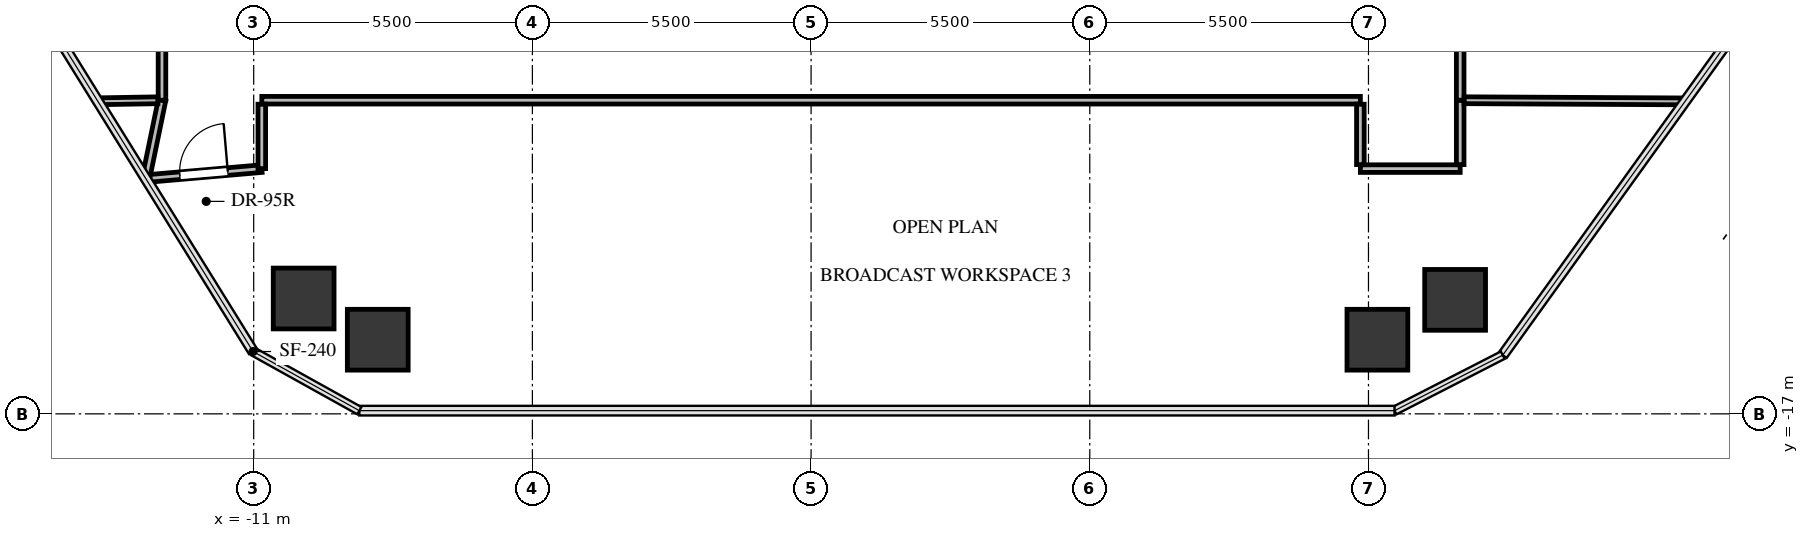
"""IFC4 building model, lengths in metres.
Left out: names, types, materials, properties, quantities, classifications, styles, units other than length and angle.
Written with IfcOpenShell. Run it as: python <this file> out.ifc"""

import sys

from ifc_helpers import new_model, si_unit, direction, frame, frame_2d, origin, origin_2d, place, context, subcontext, project, spatial, rectangle, extrude, source, transform, mapped, element, fill, save


model = new_model("IFC4")
c1 = context("Model", 3, precision=1e-05, world=origin(), true_north=direction((0.0, 1.0)))
c2 = subcontext(c1, "Body", "Model", "MODEL_VIEW")
j1 = project(units=[si_unit("LENGTHUNIT", "METRE"), si_unit("PLANEANGLEUNIT", "RADIAN")], contexts=[c1])
p1 = place(None, origin())
s1 = spatial("IfcSite", under=j1, at=p1, CompositionType="ELEMENT")
p2 = place(p1, origin())
s2 = spatial("IfcBuilding", under=s1, at=p2, CompositionType="ELEMENT")
p3 = place(p2, frame((0.0, 0.0, 100.8)))
s3 = spatial("IfcBuildingStorey", under=s2, at=p3, CompositionType="ELEMENT", Elevation=100.8)
m1 = source(origin(), c2, "Body", "SweptSolid", [
    extrude(rectangle(XDim=1.2, YDim=1.2, at=origin_2d()), origin(), (0.0, 0.0, 1.0), 3.3),
])
for number, where, z_axis, x_axis in (
    (1, (-10.014, -14.723, -0.24), (0.0, 0.0, 1.0), (1.0, 0.0, 0.0)),
    (2, (12.71, -14.75, -0.24), (0.0, 0.0, 1.0), (1.0, 0.0, 0.0)),
    (3, (11.176, -15.537, -0.24), (0.0, 0.0, 1.0), (1.0, 0.0, 0.0)),
    (4, (-8.552, -15.537, -0.24), (0.0, 0.0, 1.0), (1.0, 0.0, 0.0)),
):
    element("IfcColumn", number, at=place(p3, frame(where, z_axis=z_axis, x_axis=x_axis)), inside=s3, PredefinedType="COLUMN", context=c2, shape_type="MappedRepresentation", body=[
        mapped(m1, transform((0.0, 0.0, 0.0), x_axis=(1.0, 0.0, 0.0), y_axis=(0.0, 1.0, 0.0), z_axis=(0.0, 0.0, 1.0), scale=1.0)),
    ])
p4 = place(p3, frame((-10.84, -10.81, 0.0), z_axis=(0.0, 0.0, 1.0), x_axis=(1.0, 0.0, 0.0)))
e5 = element("IfcWall", 5, at=p4, inside=s3, PredefinedType="PARTITIONING", context=c2, shape_type="SweptSolid", body=[
    extrude(rectangle(XDim=21.68, YDim=0.15, at=frame_2d((10.84, 0.0))), origin(), (0.0, 0.0, 1.0), 2.212),
])
p5 = place(p3, frame((-13.129, -12.358, 0.0), z_axis=(0.0, 0.0, 1.0), x_axis=(0.996279168698, 0.086184789953, 0.0)))
e6 = element("IfcWall", 6, at=p5, inside=s3, PredefinedType="PARTITIONING", context=c2, shape_type="SweptSolid", body=[
    extrude(rectangle(XDim=2.297, YDim=0.15, at=frame_2d((1.149, 0.0))), origin(), (0.0, 0.0, 1.0), 2.38),
])
p6 = place(p5, frame((0.674, 0.0, 0.0)))
e7 = element("IfcOpeningElement", 7, at=p6, cuts=e6, PredefinedType="OPENING", context=c2, shape_type="SweptSolid", body=[
    extrude(rectangle(XDim=0.95, YDim=2.1, at=frame_2d((0.475, 1.05))), frame((0.0, 0.085, 0.0), z_axis=(0.0, -1.0, 0.0), x_axis=(1.0, 0.0, 0.0)), (0.0, 0.0, 1.0), 0.17),
])
p7 = place(p3, frame((10.84, -12.16, 0.0), z_axis=(0.0, 0.0, 1.0), x_axis=(1.0, 0.0, 0.0)))
e8 = element("IfcWall", 8, at=p7, inside=s3, PredefinedType="PARTITIONING", context=c2, shape_type="SweptSolid", body=[
    extrude(rectangle(XDim=1.97, YDim=0.15, at=frame_2d((0.985, 0.0))), origin(), (0.0, 0.0, 1.0), 3.045),
])
p8 = place(p3, frame((-12.81, -10.81, 0.0), z_axis=(0.0, 0.0, 1.0), x_axis=(-0.201786289638, -0.979429575474, 0.0)))
e9 = element("IfcWall", 9, at=p8, inside=s3, PredefinedType="PARTITIONING", context=c2, shape_type="SweptSolid", body=[
    extrude(rectangle(XDim=1.498, YDim=0.15, at=frame_2d((0.749, 0.0))), origin(), (0.0, 0.0, 1.0), 3.045),
])
p9 = place(p3, frame((-10.84, -12.16, 0.0), z_axis=(0.0, 0.0, 1.0), x_axis=(0.0, 1.0, 0.0)))
e10 = element("IfcWall", 10, at=p9, inside=s3, PredefinedType="PARTITIONING", context=c2, shape_type="SweptSolid", body=[
    extrude(rectangle(XDim=1.271, YDim=0.15, at=frame_2d((0.635, 0.0))), origin(), (0.0, 0.0, 1.0), 3.045),
])
p10 = place(p3, frame((10.84, -10.889, 0.0), z_axis=(0.0, 0.0, 1.0), x_axis=(0.0, -1.0, 0.0)))
e11 = element("IfcWall", 11, at=p10, inside=s3, PredefinedType="PARTITIONING", context=c2, shape_type="SweptSolid", body=[
    extrude(rectangle(XDim=1.192, YDim=0.15, at=frame_2d((0.596, 0.0))), origin(), (0.0, 0.0, 1.0), 3.045),
])
p11 = place(p3, frame((12.81, -12.081, 0.0), z_axis=(0.0, 0.0, 1.0), x_axis=(0.0, 1.0, 0.0)))
e12 = element("IfcWall", 12, at=p11, inside=s3, PredefinedType="PARTITIONING", context=c2, shape_type="SweptSolid", body=[
    extrude(rectangle(XDim=1.271, YDim=0.15, at=frame_2d((0.635, 0.0))), origin(), (0.0, 0.0, 1.0), 3.045),
])
p12 = place(p3, frame((-12.81, 10.81, 0.0), z_axis=(0.0, 0.0, 1.0), x_axis=(0.0, -1.0, 0.0)))
e13 = element("IfcWall", 13, at=p12, inside=s3, PredefinedType="PARTITIONING", context=c2, shape_type="SweptSolid", body=[
    extrude(rectangle(XDim=21.62, YDim=0.15, at=frame_2d((10.81, 0.0))), origin(), (0.0, 0.0, 1.0), 2.212),
])
p13 = place(p12, frame((10.35, 0.0, 0.0)))
e14 = element("IfcOpeningElement", 14, at=p13, cuts=e13, PredefinedType="OPENING", context=c2, shape_type="SweptSolid", body=[
    extrude(rectangle(XDim=0.92, YDim=2.1, at=frame_2d((0.46, 1.05))), frame((0.0, 0.085, 0.0), z_axis=(0.0, -1.0, 0.0), x_axis=(1.0, 0.0, 0.0)), (0.0, 0.0, 1.0), 0.17),
])
p14 = place(p3, frame((12.81, -10.81, 0.0), z_axis=(0.0, 0.0, 1.0), x_axis=(0.0, 1.0, 0.0)))
e15 = element("IfcWall", 15, at=p14, inside=s3, PredefinedType="PARTITIONING", context=c2, shape_type="SweptSolid", body=[
    extrude(rectangle(XDim=2.37, YDim=0.15, at=frame_2d((1.185, 0.0))), origin(), (0.0, 0.0, 1.0), 3.045),
])
p15 = place(p3, frame((-14.076, -10.831, 0.0), z_axis=(0.0, 0.0, 1.0), x_axis=(0.999860796611, 0.016684945308, 0.0)))
e16 = element("IfcWall", 16, at=p15, inside=s3, PredefinedType="PARTITIONING", context=c2, shape_type="SweptSolid", body=[
    extrude(rectangle(XDim=1.185, YDim=0.135, at=frame_2d((0.593, 0.0))), origin(), (0.0, 0.0, 1.0), 3.045),
])
p16 = place(p3, frame((12.889, -10.81, 0.0), z_axis=(0.0, 0.0, 1.0), x_axis=(0.999986140562, -0.005264853658, 0.0)))
e17 = element("IfcWall", 17, at=p16, inside=s3, PredefinedType="PARTITIONING", context=c2, shape_type="SweptSolid", body=[
    extrude(rectangle(XDim=4.359, YDim=0.135, at=frame_2d((2.179, 0.0))), origin(), (0.0, 0.0, 1.0), 2.38),
])
m2 = source(origin(), c2, "Body", "SweptSolid", [
    extrude(rectangle(XDim=0.95, YDim=2.1, at=frame_2d((0.475, 1.05))), frame((0.0, 0.025, 0.0), z_axis=(0.0, -1.0, 0.0), x_axis=(1.0, 0.0, 0.0)), (0.0, 0.0, 1.0), 0.05),
])
p17 = place(p6, origin())
e18 = element("IfcDoor", 18, at=p17, inside=s3, OperationType="SINGLE_SWING_RIGHT", PredefinedType="DOOR", context=c2, shape_type="MappedRepresentation", body=[
    mapped(m2, transform((0.0, 0.0, 0.0), x_axis=(1.0, 0.0, 0.0), y_axis=(0.0, 1.0, 0.0), z_axis=(0.0, 0.0, 1.0), scale=1.0)),
])
fill(e7, e18)
save(model, sys.argv[1])
